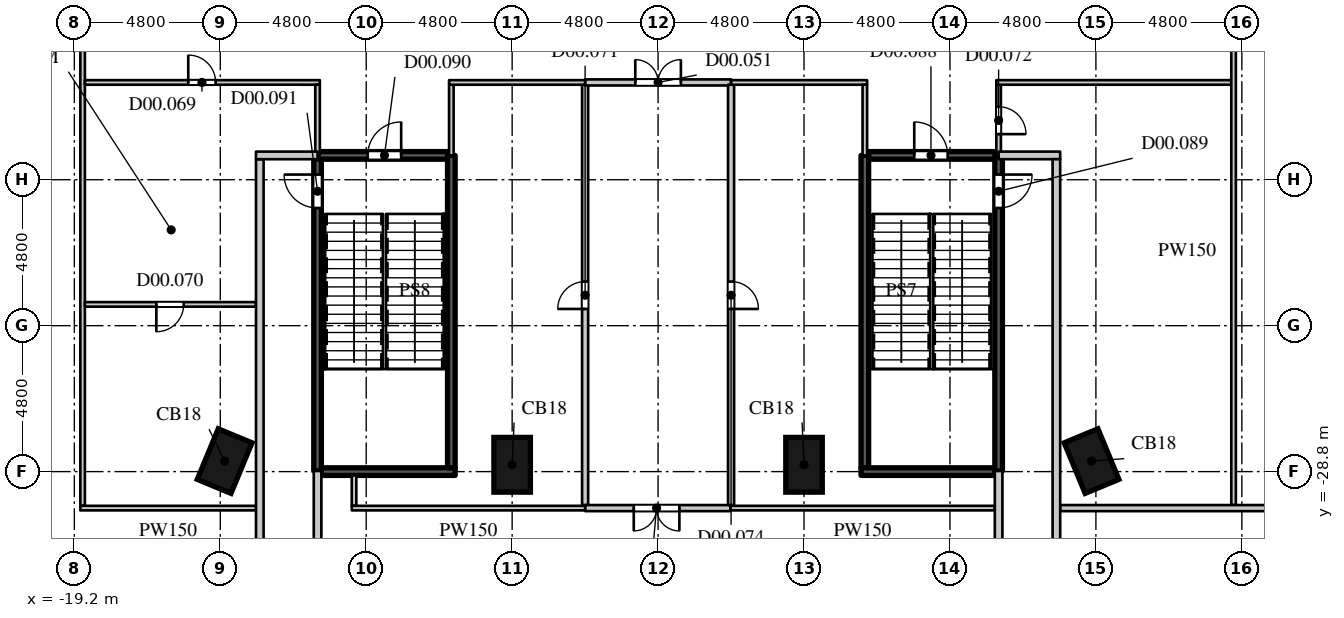
"""IFC4 building model, lengths in metres.
Left out: names, types, materials, properties, quantities, classifications, styles, units other than length and angle.
Written with IfcOpenShell. Run it as: python <this file> out.ifc"""

import sys

from ifc_helpers import new_model, si_unit, direction, frame, frame_2d, origin, origin_2d, place, context, subcontext, project, spatial, rectangle, extrude, element, fill, save


model = new_model("IFC4")
c1 = context("Model", 3, precision=1e-05, world=origin(), true_north=direction((0.0, 1.0)))
c2 = subcontext(c1, "Body", "Model", "MODEL_VIEW")
j1 = project(units=[si_unit("LENGTHUNIT", "METRE"), si_unit("PLANEANGLEUNIT", "RADIAN")], contexts=[c1])
p1 = place(None, origin())
s1 = spatial("IfcSite", under=j1, at=p1, CompositionType="ELEMENT")
p2 = place(p1, origin())
s2 = spatial("IfcBuilding", under=s1, at=p2, CompositionType="ELEMENT")
p3 = place(p2, origin())
s3 = spatial("IfcBuildingStorey", under=s2, at=p3, CompositionType="ELEMENT", Elevation=0.0)
for number, where, z_axis, x_axis in (
    (1, (-4.8, -28.575, 0.0), (0.0, 0.0, 1.0), (1.0, 0.0, 0.0)),
    (2, (4.8, -28.575, 0.0), (0.0, 0.0, 1.0), (1.0, 0.0, 0.0)),
    (3, (-14.257, -28.454, 0.0), (0.0, 0.0, 1.0), (0.924, -0.383, 0.0)),
    (4, (14.257, -28.454, 0.0), (0.0, 0.0, 1.0), (0.924, 0.383, 0.0)),
):
    element("IfcColumn", number, at=place(p3, frame(where, z_axis=z_axis, x_axis=x_axis)), inside=s3, PredefinedType="COLUMN", context=c2, shape_type="SweptSolid", body=[
        extrude(rectangle(XDim=1.2, YDim=1.8, at=origin_2d()), origin(), (0.0, 0.0, 1.0), 6.0),
    ])
p4 = place(p3, frame((-2.4, -29.9, 0.0), z_axis=(0.0, 0.0, 1.0), x_axis=(0.0, 1.0, 0.0)))
e5 = element("IfcWall", 5, at=p4, inside=s3, PredefinedType="PARTITIONING", context=c2, shape_type="SweptSolid", body=[
    extrude(rectangle(XDim=13.825, YDim=0.2, at=frame_2d((6.913, 0.0))), origin(), (0.0, 0.0, 1.0), 5.65),
])
p5 = place(p4, frame((6.45, 0.0, 0.0)))
e6 = element("IfcOpeningElement", 6, at=p5, cuts=e5, PredefinedType="OPENING", context=c2, shape_type="SweptSolid", body=[
    extrude(rectangle(XDim=0.9, YDim=2.2, at=frame_2d((0.45, 1.1))), frame((0.0, 0.11, 0.0), z_axis=(0.0, -1.0, 0.0), x_axis=(1.0, 0.0, 0.0)), (0.0, 0.0, 1.0), 0.22),
])
p6 = place(p3, frame((-2.4, -30.0, 0.0), z_axis=(0.0, 0.0, 1.0), x_axis=(1.0, 0.0, 0.0)))
e7 = element("IfcWall", 7, at=p6, inside=s3, PredefinedType="PARTITIONING", context=c2, shape_type="SweptSolid", body=[
    extrude(rectangle(XDim=4.78, YDim=0.2, at=frame_2d((2.39, 0.0))), origin(), (0.0, 0.0, 1.0), 5.65),
])
p7 = place(p6, frame((1.6, 0.0, 0.0)))
e8 = element("IfcOpeningElement", 8, at=p7, cuts=e7, PredefinedType="OPENING", context=c2, shape_type="SweptSolid", body=[
    extrude(rectangle(XDim=1.5, YDim=2.2, at=frame_2d((0.75, 1.1))), frame((0.0, 0.11, 0.0), z_axis=(0.0, -1.0, 0.0), x_axis=(1.0, 0.0, 0.0)), (0.0, 0.0, 1.0), 0.22),
])
p8 = place(p3, frame((-2.4, -16.0, 0.0), z_axis=(0.0, 0.0, 1.0), x_axis=(1.0, 0.0, 0.0)))
e9 = element("IfcWall", 9, at=p8, inside=s3, PredefinedType="PARTITIONING", context=c2, shape_type="SweptSolid", body=[
    extrude(rectangle(XDim=4.8, YDim=0.2, at=frame_2d((2.4, 0.0))), origin(), (0.0, 0.0, 1.0), 5.65),
])
p9 = place(p8, frame((1.65, 0.0, 0.0)))
e10 = element("IfcOpeningElement", 10, at=p9, cuts=e9, PredefinedType="OPENING", context=c2, shape_type="SweptSolid", body=[
    extrude(rectangle(XDim=1.5, YDim=2.2, at=frame_2d((0.75, 1.1))), frame((0.0, 0.11, 0.0), z_axis=(0.0, -1.0, 0.0), x_axis=(1.0, 0.0, 0.0)), (0.0, 0.0, 1.0), 0.22),
])
p10 = place(p3, frame((2.4, -29.9, 0.0), z_axis=(0.0, 0.0, 1.0), x_axis=(0.0, 1.0, 0.0)))
e11 = element("IfcWall", 11, at=p10, inside=s3, PredefinedType="PARTITIONING", context=c2, shape_type="SweptSolid", body=[
    extrude(rectangle(XDim=13.825, YDim=0.2, at=frame_2d((6.913, 0.0))), origin(), (0.0, 0.0, 1.0), 5.65),
])
p11 = place(p10, frame((6.45, 0.0, 0.0)))
e12 = element("IfcOpeningElement", 12, at=p11, cuts=e11, PredefinedType="OPENING", context=c2, shape_type="SweptSolid", body=[
    extrude(rectangle(XDim=0.9, YDim=2.2, at=frame_2d((0.45, 1.1))), frame((0.0, 0.11, 0.0), z_axis=(0.0, -1.0, 0.0), x_axis=(1.0, 0.0, 0.0)), (0.0, 0.0, 1.0), 0.22),
])
p12 = place(p3, frame((-18.928, -29.925, 0.0), z_axis=(0.0, 0.0, 1.0), x_axis=(0.0, 1.0, 0.0)))
e13 = element("IfcWall", 13, at=p12, inside=s3, PredefinedType="PARTITIONING", context=c2, shape_type="SweptSolid", body=[
    extrude(rectangle(XDim=16.7, YDim=0.15, at=frame_2d((8.35, 0.0))), origin(), (0.0, 0.0, 1.0), 5.65),
])
p13 = place(p3, frame((-19.003, -30.0, 0.0), z_axis=(0.0, 0.0, 1.0), x_axis=(1.0, 0.0, 0.0)))
e14 = element("IfcWall", 14, at=p13, inside=s3, PredefinedType="PARTITIONING", context=c2, shape_type="SweptSolid", body=[
    extrude(rectangle(XDim=5.778, YDim=0.15, at=frame_2d((2.889, 0.0))), origin(), (0.0, 0.0, 1.0), 5.65),
])
p14 = place(p3, frame((-18.853, -23.3, 0.0), z_axis=(0.0, 0.0, 1.0), x_axis=(1.0, 0.0, 0.0)))
e15 = element("IfcWall", 15, at=p14, inside=s3, PredefinedType="PARTITIONING", context=c2, shape_type="SweptSolid", body=[
    extrude(rectangle(XDim=5.628, YDim=0.15, at=frame_2d((2.814, 0.0))), origin(), (0.0, 0.0, 1.0), 5.65),
])
p15 = place(p14, frame((2.35, 0.0, 0.0)))
e16 = element("IfcOpeningElement", 16, at=p15, cuts=e15, PredefinedType="OPENING", context=c2, shape_type="SweptSolid", body=[
    extrude(rectangle(XDim=0.9, YDim=2.2, at=frame_2d((0.45, 1.1))), frame((0.0, 0.085, 0.0), z_axis=(0.0, -1.0, 0.0), x_axis=(1.0, 0.0, 0.0)), (0.0, 0.0, 1.0), 0.17),
])
p16 = place(p3, frame((-18.853, -16.0, 0.0), z_axis=(0.0, 0.0, 1.0), x_axis=(1.0, 0.0, 0.0)))
e17 = element("IfcWall", 17, at=p16, inside=s3, PredefinedType="PARTITIONING", context=c2, shape_type="SweptSolid", body=[
    extrude(rectangle(XDim=7.728, YDim=0.15, at=frame_2d((3.864, 0.0))), origin(), (0.0, 0.0, 1.0), 5.65),
])
p17 = place(p16, frame((3.4, 0.0, 0.0)))
e18 = element("IfcOpeningElement", 18, at=p17, cuts=e17, PredefinedType="OPENING", context=c2, shape_type="SweptSolid", body=[
    extrude(rectangle(XDim=0.9, YDim=2.2, at=frame_2d((0.45, 1.1))), frame((0.0, 0.085, 0.0), z_axis=(0.0, -1.0, 0.0), x_axis=(1.0, 0.0, 0.0)), (0.0, 0.0, 1.0), 0.17),
])
p18 = place(p3, frame((-11.2, -18.4, 0.0), z_axis=(0.0, 0.0, 1.0), x_axis=(0.0, 1.0, 0.0)))
e19 = element("IfcWall", 19, at=p18, inside=s3, PredefinedType="PARTITIONING", context=c2, shape_type="SweptSolid", body=[
    extrude(rectangle(XDim=2.325, YDim=0.15, at=frame_2d((1.163, 0.0))), origin(), (0.0, 0.0, 1.0), 5.65),
])
p19 = place(p3, frame((-10.0, -29.925, 0.0), z_axis=(0.0, 0.0, 1.0), x_axis=(0.0, 1.0, 0.0)))
e20 = element("IfcWall", 20, at=p19, inside=s3, PredefinedType="PARTITIONING", context=c2, shape_type="SweptSolid", body=[
    extrude(rectangle(XDim=1.0, YDim=0.15, at=frame_2d((0.5, 0.0))), origin(), (0.0, 0.0, 1.0), 5.65),
])
p20 = place(p3, frame((-10.075, -30.0, 0.0), z_axis=(0.0, 0.0, 1.0), x_axis=(1.0, 0.0, 0.0)))
e21 = element("IfcWall", 21, at=p20, inside=s3, PredefinedType="PARTITIONING", context=c2, shape_type="SweptSolid", body=[
    extrude(rectangle(XDim=7.675, YDim=0.15, at=frame_2d((3.837, 0.0))), origin(), (0.0, 0.0, 1.0), 5.65),
])
p21 = place(p3, frame((-6.8, -18.4, 0.0), z_axis=(0.0, 0.0, 1.0), x_axis=(0.0, 1.0, 0.0)))
e22 = element("IfcWall", 22, at=p21, inside=s3, PredefinedType="PARTITIONING", context=c2, shape_type="SweptSolid", body=[
    extrude(rectangle(XDim=2.325, YDim=0.15, at=frame_2d((1.163, 0.0))), origin(), (0.0, 0.0, 1.0), 5.65),
])
p22 = place(p3, frame((-6.875, -16.0, 0.0), z_axis=(0.0, 0.0, 1.0), x_axis=(1.0, 0.0, 0.0)))
e23 = element("IfcWall", 23, at=p22, inside=s3, PredefinedType="PARTITIONING", context=c2, shape_type="SweptSolid", body=[
    extrude(rectangle(XDim=4.475, YDim=0.15, at=frame_2d((2.238, 0.0))), origin(), (0.0, 0.0, 1.0), 5.65),
])
p23 = place(p3, frame((2.38, -30.0, 0.0), z_axis=(0.0, 0.0, 1.0), x_axis=(1.0, 0.0, 0.0)))
e24 = element("IfcWall", 24, at=p23, inside=s3, PredefinedType="PARTITIONING", context=c2, shape_type="SweptSolid", body=[
    extrude(rectangle(XDim=8.695, YDim=0.15, at=frame_2d((4.348, 0.0))), origin(), (0.0, 0.0, 1.0), 5.65),
])
p24 = place(p3, frame((2.4, -16.0, 0.0), z_axis=(0.0, 0.0, 1.0), x_axis=(1.0, 0.0, 0.0)))
e25 = element("IfcWall", 25, at=p24, inside=s3, PredefinedType="PARTITIONING", context=c2, shape_type="SweptSolid", body=[
    extrude(rectangle(XDim=4.475, YDim=0.15, at=frame_2d((2.238, 0.0))), origin(), (0.0, 0.0, 1.0), 5.65),
])
p25 = place(p3, frame((6.8, -18.4, 0.0), z_axis=(0.0, 0.0, 1.0), x_axis=(0.0, 1.0, 0.0)))
e26 = element("IfcWall", 26, at=p25, inside=s3, PredefinedType="PARTITIONING", context=c2, shape_type="SweptSolid", body=[
    extrude(rectangle(XDim=2.325, YDim=0.15, at=frame_2d((1.163, 0.0))), origin(), (0.0, 0.0, 1.0), 5.65),
])
p26 = place(p3, frame((11.2, -18.4, 0.0), z_axis=(0.0, 0.0, 1.0), x_axis=(0.0, 1.0, 0.0)))
e27 = element("IfcWall", 27, at=p26, inside=s3, PredefinedType="PARTITIONING", context=c2, shape_type="SweptSolid", body=[
    extrude(rectangle(XDim=2.325, YDim=0.15, at=frame_2d((1.163, 0.0))), origin(), (0.0, 0.0, 1.0), 5.65),
])
p27 = place(p26, frame((0.7, 0.0, 0.0)))
e28 = element("IfcOpeningElement", 28, at=p27, cuts=e27, PredefinedType="OPENING", context=c2, shape_type="SweptSolid", body=[
    extrude(rectangle(XDim=0.9, YDim=2.2, at=frame_2d((0.45, 1.1))), frame((0.0, 0.085, 0.0), z_axis=(0.0, -1.0, 0.0), x_axis=(1.0, 0.0, 0.0)), (0.0, 0.0, 1.0), 0.17),
])
p28 = place(p3, frame((11.125, -16.0, 0.0), z_axis=(0.0, 0.0, 1.0), x_axis=(1.0, 0.0, 0.0)))
e29 = element("IfcWall", 29, at=p28, inside=s3, PredefinedType="PARTITIONING", context=c2, shape_type="SweptSolid", body=[
    extrude(rectangle(XDim=7.728, YDim=0.15, at=frame_2d((3.864, 0.0))), origin(), (0.0, 0.0, 1.0), 5.65),
])
p29 = place(p3, frame((18.928, -29.9, 0.0), z_axis=(0.0, 0.0, 1.0), x_axis=(0.0, 1.0, 0.0)))
e30 = element("IfcWall", 30, at=p29, inside=s3, PredefinedType="PARTITIONING", context=c2, shape_type="SweptSolid", body=[
    extrude(rectangle(XDim=16.675, YDim=0.15, at=frame_2d((8.337, 0.0))), origin(), (0.0, 0.0, 1.0), 5.65),
])
p30 = place(p3, frame((13.225, -30.0, 0.0), z_axis=(0.0, 0.0, 1.0), x_axis=(1.0, 0.0, 0.0)))
e31 = element("IfcWall", 31, at=p30, inside=s3, PredefinedType="PARTITIONING", context=c2, shape_type="SweptSolid", body=[
    extrude(rectangle(XDim=12.24, YDim=0.2, at=frame_2d((6.12, 0.0))), origin(), (0.0, 0.0, 1.0), 5.65),
])
p31 = place(p3, frame((-11.2, -28.78, 0.0), z_axis=(0.0, 0.0, 1.0), x_axis=(0.0, 1.0, 0.0)))
e32 = element("IfcWall", 32, at=p31, inside=s3, PredefinedType="SHEAR", context=c2, shape_type="SweptSolid", body=[
    extrude(rectangle(XDim=10.38, YDim=0.25, at=frame_2d((5.19, 0.0))), origin(), (0.0, 0.0, 1.0), 5.65),
])
p32 = place(p31, frame((8.65, 0.0, 0.0)))
e33 = element("IfcOpeningElement", 33, at=p32, cuts=e32, PredefinedType="OPENING", context=c2, shape_type="SweptSolid", body=[
    extrude(rectangle(XDim=1.1, YDim=2.2, at=frame_2d((0.55, 1.1))), frame((0.0, 0.135, 0.0), z_axis=(0.0, -1.0, 0.0), x_axis=(1.0, 0.0, 0.0)), (0.0, 0.0, 1.0), 0.27),
])
p33 = place(p3, frame((-11.075, -28.8, 0.0), z_axis=(0.0, 0.0, 1.0), x_axis=(1.0, 0.0, 0.0)))
e34 = element("IfcWall", 34, at=p33, inside=s3, PredefinedType="SHEAR", context=c2, shape_type="SweptSolid", body=[
    extrude(rectangle(XDim=4.4, YDim=0.25, at=frame_2d((2.2, 0.0))), origin(), (0.0, 0.0, 1.0), 5.65),
])
p34 = place(p3, frame((-11.2, -18.4, 0.0), z_axis=(0.0, 0.0, 1.0), x_axis=(1.0, 0.0, 0.0)))
e35 = element("IfcWall", 35, at=p34, inside=s3, PredefinedType="SHEAR", context=c2, shape_type="SweptSolid", body=[
    extrude(rectangle(XDim=4.275, YDim=0.25, at=frame_2d((2.137, 0.0))), origin(), (0.0, 0.0, 1.0), 5.65),
])
p35 = place(p34, frame((1.65, 0.0, 0.0)))
e36 = element("IfcOpeningElement", 36, at=p35, cuts=e35, PredefinedType="OPENING", context=c2, shape_type="SweptSolid", body=[
    extrude(rectangle(XDim=1.1, YDim=2.2, at=frame_2d((0.55, 1.1))), frame((0.0, 0.135, 0.0), z_axis=(0.0, -1.0, 0.0), x_axis=(1.0, 0.0, 0.0)), (0.0, 0.0, 1.0), 0.27),
])
for number, where, z_axis, x_axis in (
    (37, (-6.8, -28.675, 0.0), (0.0, 0.0, 1.0), (0.0, 1.0, 0.0)),
    (38, (6.8, -28.675, 0.0), (0.0, 0.0, 1.0), (0.0, 1.0, 0.0)),
):
    element("IfcWall", number, at=place(p3, frame(where, z_axis=z_axis, x_axis=x_axis)), inside=s3, PredefinedType="SHEAR", context=c2, shape_type="SweptSolid", body=[
        extrude(rectangle(XDim=10.275, YDim=0.25, at=frame_2d((5.138, 0.0))), origin(), (0.0, 0.0, 1.0), 5.65),
    ])
p36 = place(p3, frame((6.675, -28.8, 0.0), z_axis=(0.0, 0.0, 1.0), x_axis=(1.0, 0.0, 0.0)))
e39 = element("IfcWall", 39, at=p36, inside=s3, PredefinedType="SHEAR", context=c2, shape_type="SweptSolid", body=[
    extrude(rectangle(XDim=4.4, YDim=0.25, at=frame_2d((2.2, 0.0))), origin(), (0.0, 0.0, 1.0), 5.65),
])
p37 = place(p3, frame((6.925, -18.4, 0.0), z_axis=(0.0, 0.0, 1.0), x_axis=(1.0, 0.0, 0.0)))
e40 = element("IfcWall", 40, at=p37, inside=s3, PredefinedType="SHEAR", context=c2, shape_type="SweptSolid", body=[
    extrude(rectangle(XDim=4.275, YDim=0.25, at=frame_2d((2.137, 0.0))), origin(), (0.0, 0.0, 1.0), 5.65),
])
p38 = place(p37, frame((1.5, 0.0, 0.0)))
e41 = element("IfcOpeningElement", 41, at=p38, cuts=e40, PredefinedType="OPENING", context=c2, shape_type="SweptSolid", body=[
    extrude(rectangle(XDim=1.1, YDim=2.2, at=frame_2d((0.55, 1.1))), frame((0.0, 0.135, 0.0), z_axis=(0.0, -1.0, 0.0), x_axis=(1.0, 0.0, 0.0)), (0.0, 0.0, 1.0), 0.27),
])
p39 = place(p3, frame((11.2, -28.78, 0.0), z_axis=(0.0, 0.0, 1.0), x_axis=(0.0, 1.0, 0.0)))
e42 = element("IfcWall", 42, at=p39, inside=s3, PredefinedType="SHEAR", context=c2, shape_type="SweptSolid", body=[
    extrude(rectangle(XDim=10.38, YDim=0.25, at=frame_2d((5.19, 0.0))), origin(), (0.0, 0.0, 1.0), 5.65),
])
p40 = place(p39, frame((8.65, 0.0, 0.0)))
e43 = element("IfcOpeningElement", 43, at=p40, cuts=e42, PredefinedType="OPENING", context=c2, shape_type="SweptSolid", body=[
    extrude(rectangle(XDim=1.1, YDim=2.2, at=frame_2d((0.55, 1.1))), frame((0.0, 0.135, 0.0), z_axis=(0.0, -1.0, 0.0), x_axis=(1.0, 0.0, 0.0)), (0.0, 0.0, 1.0), 0.27),
])
p41 = place(p3, frame((-13.1, -41.0, 0.0), z_axis=(0.0, 0.0, 1.0), x_axis=(0.0, 1.0, 0.0)))
e44 = element("IfcWall", 44, at=p41, inside=s3, PredefinedType="PARTITIONING", context=c2, shape_type="SweptSolid", body=[
    extrude(rectangle(XDim=22.475, YDim=0.25, at=frame_2d((11.238, 0.0))), origin(), (0.0, 0.0, 1.0), 5.65),
])
p42 = place(p3, frame((-13.225, -18.4, 0.0), z_axis=(0.0, 0.0, 1.0), x_axis=(1.0, 0.0, 0.0)))
e45 = element("IfcWall", 45, at=p42, inside=s3, PredefinedType="PARTITIONING", context=c2, shape_type="SweptSolid", body=[
    extrude(rectangle(XDim=2.025, YDim=0.25, at=frame_2d((1.013, 0.0))), origin(), (0.0, 0.0, 1.0), 5.65),
])
for number, where, z_axis, x_axis in (
    (46, (-11.2, -39.875, 0.0), (0.0, 0.0, 1.0), (0.0, 1.0, 0.0)),
    (47, (11.2, -39.875, 0.0), (0.0, 0.0, 1.0), (0.0, 1.0, 0.0)),
):
    element("IfcWall", number, at=place(p3, frame(where, z_axis=z_axis, x_axis=x_axis)), inside=s3, PredefinedType="PARTITIONING", context=c2, shape_type="SweptSolid", body=[
        extrude(rectangle(XDim=11.095, YDim=0.25, at=frame_2d((5.547, 0.0))), origin(), (0.0, 0.0, 1.0), 5.65),
    ])
p43 = place(p3, frame((11.2, -18.4, 0.0), z_axis=(0.0, 0.0, 1.0), x_axis=(1.0, 0.0, 0.0)))
e48 = element("IfcWall", 48, at=p43, inside=s3, PredefinedType="PARTITIONING", context=c2, shape_type="SweptSolid", body=[
    extrude(rectangle(XDim=2.025, YDim=0.25, at=frame_2d((1.013, 0.0))), origin(), (0.0, 0.0, 1.0), 5.65),
])
p44 = place(p3, frame((13.1, -41.0, 0.0), z_axis=(0.0, 0.0, 1.0), x_axis=(0.0, 1.0, 0.0)))
e49 = element("IfcWall", 49, at=p44, inside=s3, PredefinedType="PARTITIONING", context=c2, shape_type="SweptSolid", body=[
    extrude(rectangle(XDim=22.475, YDim=0.25, at=frame_2d((11.238, 0.0))), origin(), (0.0, 0.0, 1.0), 5.65),
])
p45 = place(p9, origin())
e50 = element("IfcDoor", 50, at=p45, inside=s3, OperationType="DOUBLE_DOOR_SINGLE_SWING", PredefinedType="DOOR", context=c2, shape_type="SweptSolid", body=[
    extrude(rectangle(XDim=1.5, YDim=2.2, at=frame_2d((0.75, 1.1))), frame((0.0, 0.025, 0.0), z_axis=(0.0, -1.0, 0.0), x_axis=(1.0, 0.0, 0.0)), (0.0, 0.0, 1.0), 0.05),
])
fill(e10, e50)
p46 = place(p7, origin())
e51 = element("IfcDoor", 51, at=p46, inside=s3, OperationType="DOUBLE_DOOR_SINGLE_SWING", PredefinedType="DOOR", context=c2, shape_type="SweptSolid", body=[
    extrude(rectangle(XDim=1.5, YDim=2.2, at=frame_2d((0.75, 1.1))), frame((0.0, 0.025, 0.0), z_axis=(0.0, -1.0, 0.0), x_axis=(1.0, 0.0, 0.0)), (0.0, 0.0, 1.0), 0.05),
])
fill(e8, e51)
p47 = place(p17, origin())
e52 = element("IfcDoor", 52, at=p47, inside=s3, OperationType="SINGLE_SWING_LEFT", PredefinedType="DOOR", context=c2, shape_type="SweptSolid", body=[
    extrude(rectangle(XDim=0.9, YDim=2.2, at=frame_2d((0.45, 1.1))), frame((0.0, 0.025, 0.0), z_axis=(0.0, -1.0, 0.0), x_axis=(1.0, 0.0, 0.0)), (0.0, 0.0, 1.0), 0.05),
])
fill(e18, e52)
p48 = place(p15, origin())
e53 = element("IfcDoor", 53, at=p48, inside=s3, OperationType="SINGLE_SWING_RIGHT", PredefinedType="DOOR", context=c2, shape_type="SweptSolid", body=[
    extrude(rectangle(XDim=0.9, YDim=2.2, at=frame_2d((0.45, 1.1))), frame((0.0, 0.025, 0.0), z_axis=(0.0, -1.0, 0.0), x_axis=(1.0, 0.0, 0.0)), (0.0, 0.0, 1.0), 0.05),
])
fill(e16, e53)
p49 = place(p5, origin())
e54 = element("IfcDoor", 54, at=p49, inside=s3, OperationType="SINGLE_SWING_LEFT", PredefinedType="DOOR", context=c2, shape_type="SweptSolid", body=[
    extrude(rectangle(XDim=0.9, YDim=2.2, at=frame_2d((0.45, 1.1))), frame((0.0, 0.025, 0.0), z_axis=(0.0, -1.0, 0.0), x_axis=(1.0, 0.0, 0.0)), (0.0, 0.0, 1.0), 0.05),
])
fill(e6, e54)
p50 = place(p27, origin())
e55 = element("IfcDoor", 55, at=p50, inside=s3, OperationType="SINGLE_SWING_RIGHT", PredefinedType="DOOR", context=c2, shape_type="SweptSolid", body=[
    extrude(rectangle(XDim=0.9, YDim=2.2, at=frame_2d((0.45, 1.1))), frame((0.0, 0.025, 0.0), z_axis=(0.0, -1.0, 0.0), x_axis=(1.0, 0.0, 0.0)), (0.0, 0.0, 1.0), 0.05),
])
fill(e28, e55)
p51 = place(p11, origin())
e56 = element("IfcDoor", 56, at=p51, inside=s3, OperationType="SINGLE_SWING_RIGHT", PredefinedType="DOOR", context=c2, shape_type="SweptSolid", body=[
    extrude(rectangle(XDim=0.9, YDim=2.2, at=frame_2d((0.45, 1.1))), frame((0.0, 0.025, 0.0), z_axis=(0.0, -1.0, 0.0), x_axis=(1.0, 0.0, 0.0)), (0.0, 0.0, 1.0), 0.05),
])
fill(e12, e56)
p52 = place(p38, origin())
e57 = element("IfcDoor", 57, at=p52, inside=s3, OperationType="SINGLE_SWING_LEFT", PredefinedType="DOOR", context=c2, shape_type="SweptSolid", body=[
    extrude(rectangle(XDim=1.1, YDim=2.2, at=frame_2d((0.55, 1.1))), frame((0.0, 0.025, 0.0), z_axis=(0.0, -1.0, 0.0), x_axis=(1.0, 0.0, 0.0)), (0.0, 0.0, 1.0), 0.05),
])
fill(e41, e57)
p53 = place(p40, origin())
e58 = element("IfcDoor", 58, at=p53, inside=s3, OperationType="SINGLE_SWING_LEFT", PredefinedType="DOOR", context=c2, shape_type="SweptSolid", body=[
    extrude(rectangle(XDim=1.1, YDim=2.2, at=frame_2d((0.55, 1.1))), frame((0.0, 0.025, 0.0), z_axis=(0.0, -1.0, 0.0), x_axis=(1.0, 0.0, 0.0)), (0.0, 0.0, 1.0), 0.05),
])
fill(e43, e58)
p54 = place(p35, origin())
e59 = element("IfcDoor", 59, at=p54, inside=s3, OperationType="SINGLE_SWING_RIGHT", PredefinedType="DOOR", context=c2, shape_type="SweptSolid", body=[
    extrude(rectangle(XDim=1.1, YDim=2.2, at=frame_2d((0.55, 1.1))), frame((0.0, 0.025, 0.0), z_axis=(0.0, -1.0, 0.0), x_axis=(1.0, 0.0, 0.0)), (0.0, 0.0, 1.0), 0.05),
])
fill(e36, e59)
p55 = place(p32, origin())
e60 = element("IfcDoor", 60, at=p55, inside=s3, OperationType="SINGLE_SWING_RIGHT", PredefinedType="DOOR", context=c2, shape_type="SweptSolid", body=[
    extrude(rectangle(XDim=1.1, YDim=2.2, at=frame_2d((0.55, 1.1))), frame((0.0, 0.025, 0.0), z_axis=(0.0, -1.0, 0.0), x_axis=(1.0, 0.0, 0.0)), (0.0, 0.0, 1.0), 0.05),
])
fill(e33, e60)
save(model, sys.argv[1])
